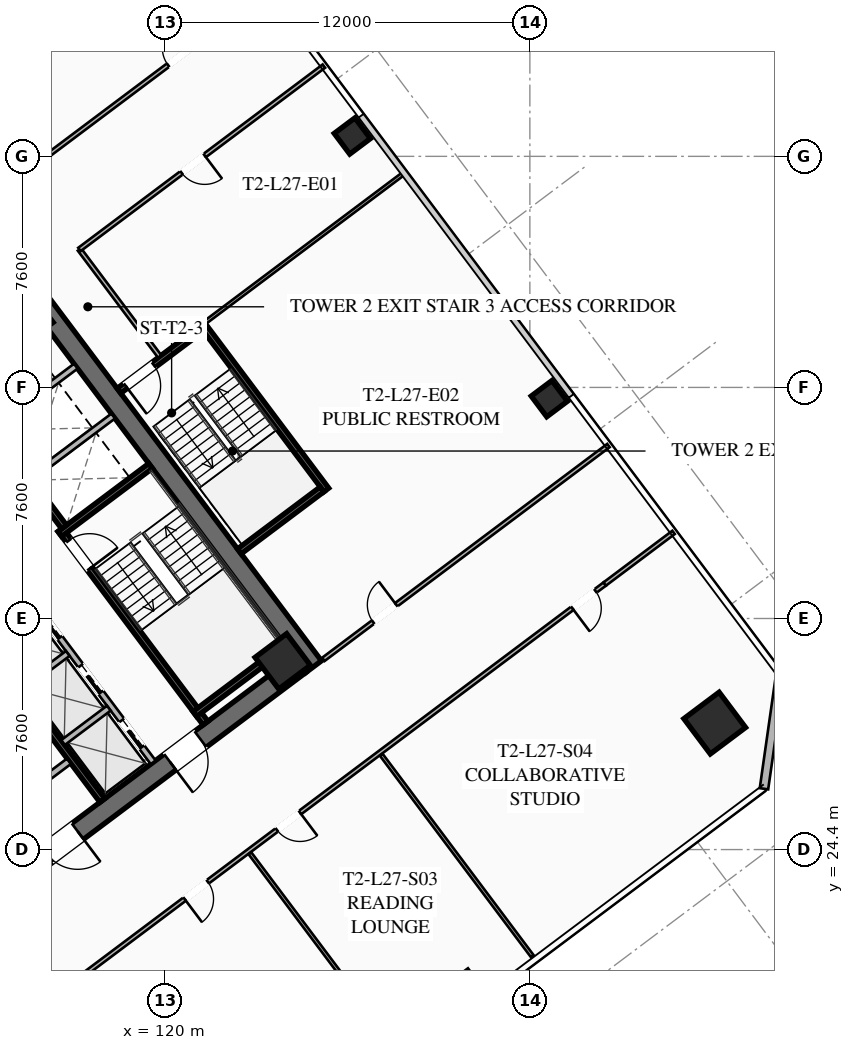
"""IFC4 building model, lengths in metres.
Left out: names, types, materials, properties, quantities, classifications, styles, units other than length and angle.
Written with IfcOpenShell. Run it as: python <this file> out.ifc"""

import sys

from ifc_helpers import new_model, si_unit, direction, frame, frame_2d, origin, origin_2d, place, context, subcontext, project, spatial, rectangle, hollow_rectangle, extrude, element, fill, save


model = new_model("IFC4")
c1 = context("Model", 3, precision=1e-05, world=origin(), true_north=direction((0.0, 1.0)))
c2 = subcontext(c1, "Body", "Model", "MODEL_VIEW")
j1 = project(units=[si_unit("LENGTHUNIT", "METRE"), si_unit("PLANEANGLEUNIT", "RADIAN")], contexts=[c1])
p1 = place(None, origin())
s1 = spatial("IfcSite", under=j1, at=p1, CompositionType="ELEMENT")
p2 = place(p1, origin())
s2 = spatial("IfcBuilding", under=s1, at=p2, CompositionType="ELEMENT")
p3 = place(p2, frame((0.0, 0.0, 102.7)))
s3 = spatial("IfcBuildingStorey", under=s2, at=p3, CompositionType="ELEMENT", Elevation=102.7)
p4 = place(p3, frame((115.524, 42.893, 0.0), z_axis=(0.0, 0.0, 1.0), x_axis=(0.600005007985, -0.799996243986, 0.0)))
e1 = element("IfcWall", 1, at=p4, inside=s3, PredefinedType="SHEAR", context=c2, shape_type="SweptSolid", body=[
    extrude(rectangle(XDim=15.6, YDim=0.65, at=frame_2d((7.8, 0.0))), origin(), (0.0, 0.0, 1.0), 3.55),
])
p5 = place(p3, frame((124.429, 30.478, 0.0), z_axis=(0.0, 0.0, 1.0), x_axis=(-0.799998028465, -0.600002628705, 0.0)))
e2 = element("IfcWall", 2, at=p5, inside=s3, PredefinedType="SHEAR", context=c2, shape_type="SweptSolid", body=[
    extrude(rectangle(XDim=14.86, YDim=0.65, at=frame_2d((7.43, 0.0))), origin(), (0.0, 0.0, 1.0), 3.55),
])
p6 = place(p5, frame((9.13, 0.0, 0.0)))
e3 = element("IfcOpeningElement", 3, at=p6, cuts=e2, PredefinedType="OPENING", context=c2, shape_type="SweptSolid", body=[
    extrude(rectangle(XDim=1.25, YDim=2.25, at=frame_2d((0.625, 1.125))), frame((0.0, 0.335, 0.0), z_axis=(0.0, -1.0, 0.0), x_axis=(1.0, 0.0, 0.0)), (0.0, 0.0, 1.0), 0.67),
])
p7 = place(p5, frame((4.08, 0.0, 0.0)))
e4 = element("IfcOpeningElement", 4, at=p7, cuts=e2, PredefinedType="OPENING", context=c2, shape_type="SweptSolid", body=[
    extrude(rectangle(XDim=1.25, YDim=2.25, at=frame_2d((0.625, 1.125))), frame((0.0, 0.335, 0.0), z_axis=(0.0, -1.0, 0.0), x_axis=(1.0, 0.0, 0.0)), (0.0, 0.0, 1.0), 0.67),
])
for number, where, z_axis, x_axis in (
    (5, (123.87, 30.59, 0.0), (0.0, 0.0, 1.0), (0.8, 0.6, 0.0)),
    (6, (115.41, 41.87, 0.0), (0.0, 0.0, 1.0), (0.8, 0.6, 0.0)),
):
    element("IfcColumn", number, at=place(p3, frame(where, z_axis=z_axis, x_axis=x_axis)), inside=s3, PredefinedType="COLUMN", context=c2, shape_type="SweptSolid", body=[
        extrude(hollow_rectangle(XDim=1.3, YDim=1.3, WallThickness=0.05, at=origin_2d()), origin(), (0.0, 0.0, 1.0), 3.35),
    ])
p8 = place(p3, frame((138.08, 28.56, 0.0), z_axis=(0.0, 0.0, 1.0), x_axis=(0.799999996291, 0.600000004945, 0.0)))
e7 = element("IfcColumn", 7, at=p8, inside=s3, PredefinedType="COLUMN", context=c2, shape_type="SweptSolid", body=[
    extrude(hollow_rectangle(XDim=1.45, YDim=1.45, WallThickness=0.055, at=origin_2d()), origin(), (0.0, 0.0, 1.0), 3.35),
])
for number, where, z_axis, x_axis in (
    (8, (132.64, 39.23, 0.0), (0.0, 0.0, 1.0), (0.8, 0.6, 0.0)),
    (9, (126.16, 47.87, 0.0), (0.0, 0.0, 1.0), (0.8, 0.6, 0.0)),
):
    element("IfcColumn", number, at=place(p3, frame(where, z_axis=z_axis, x_axis=x_axis)), inside=s3, PredefinedType="COLUMN", context=c2, shape_type="SweptSolid", body=[
        extrude(hollow_rectangle(XDim=0.85, YDim=0.85, WallThickness=0.035, at=origin_2d()), origin(), (0.0, 0.0, 1.0), 3.35),
    ])
p9 = place(p3, frame((140.24, 30.18, 0.0), z_axis=(0.0, 0.0, 1.0), x_axis=(-0.141430307517, -0.989948214866, 0.0)))
e10 = element("IfcWall", 10, at=p9, inside=s3, PredefinedType="SOLIDWALL", context=c2, shape_type="SweptSolid", body=[
    extrude(rectangle(XDim=3.818, YDim=0.28, at=frame_2d((1.909, 0.0))), origin(), (0.0, 0.0, 1.0), 3.35),
])
p10 = place(p3, frame((116.56, 34.92, 0.0), z_axis=(0.0, 0.0, 1.0), x_axis=(0.600009827119, -0.799992629566, 0.0)))
e11 = element("IfcWall", 11, at=p10, inside=s3, PredefinedType="SHEAR", context=c2, shape_type="SweptSolid", body=[
    extrude(rectangle(XDim=7.95, YDim=0.2, at=frame_2d((3.975, 0.0))), origin(), (0.0, 0.0, 1.0), 3.35),
])
p11 = place(p10, frame((0.45, 0.0, 0.0)))
e12 = element("IfcOpeningElement", 12, at=p11, cuts=e11, PredefinedType="OPENING", context=c2, shape_type="SweptSolid", body=[
    extrude(rectangle(XDim=1.15, YDim=2.2, at=frame_2d((0.575, 1.1))), frame((0.0, 0.11, 0.0), z_axis=(0.0, -1.0, 0.0), x_axis=(1.0, 0.0, 0.0)), (0.0, 0.0, 1.0), 0.22),
])
for number, where, z_axis, x_axis in (
    (13, (116.54, 34.78, 0.0), (0.0, 0.0, 1.0), (0.8, 0.6, 0.0)),
    (14, (120.98, 28.86, 0.0), (0.0, 0.0, 1.0), (0.8, 0.6, 0.0)),
):
    element("IfcWall", number, at=place(p3, frame(where, z_axis=z_axis, x_axis=x_axis)), inside=s3, PredefinedType="SHEAR", context=c2, shape_type="SweptSolid", body=[
        extrude(rectangle(XDim=3.73, YDim=0.2, at=frame_2d((1.865, 0.0))), origin(), (0.0, 0.0, 1.0), 3.35),
    ])
p12 = place(p3, frame((117.938, 26.016, 0.0), z_axis=(0.0, 0.0, 1.0), x_axis=(-0.600005463273, 0.799995902516, 0.0)))
e15 = element("IfcWall", 15, at=p12, inside=s3, PredefinedType="SHEAR", context=c2, shape_type="SweptSolid", body=[
    extrude(rectangle(XDim=14.3, YDim=0.2, at=frame_2d((7.15, 0.0))), origin(), (0.0, 0.0, 1.0), 3.35),
])
p13 = place(p3, frame((114.316, 25.412, 0.0), z_axis=(0.0, 0.0, 1.0), x_axis=(0.800018601094, 0.59997519774, 0.0)))
e16 = element("IfcWall", 16, at=p13, inside=s3, PredefinedType="SOLIDWALL", context=c2, shape_type="SweptSolid", body=[
    extrude(rectangle(XDim=3.15, YDim=0.22, at=frame_2d((1.575, 0.0))), origin(), (0.0, 0.0, 1.0), 2.703),
])
p14 = place(p13, frame((0.95, 0.0, 0.0)))
e17 = element("IfcOpeningElement", 17, at=p14, cuts=e16, PredefinedType="OPENING", context=c2, shape_type="SweptSolid", body=[
    extrude(rectangle(XDim=1.25, YDim=2.25, at=frame_2d((0.625, 1.125))), frame((0.0, 0.12, 0.0), z_axis=(0.0, -1.0, 0.0), x_axis=(1.0, 0.0, 0.0)), (0.0, 0.0, 1.0), 0.24),
])
p15 = place(p3, frame((112.87, 40.09, 0.0), z_axis=(0.0, 0.0, 1.0), x_axis=(0.599975393228, -0.800018454488, 0.0)))
e18 = element("IfcWall", 18, at=p15, inside=s3, PredefinedType="SHEAR", context=c2, shape_type="SweptSolid", body=[
    extrude(rectangle(XDim=6.35, YDim=0.2, at=frame_2d((3.175, 0.0))), origin(), (0.0, 0.0, 1.0), 3.35),
])
for number, where, z_axis, x_axis in (
    (19, (115.59, 36.63, 0.0), (0.0, 0.0, 1.0), (0.8, 0.6, 0.0)),
    (20, (114.36, 38.27, 0.0), (0.0, 0.0, 1.0), (0.8, 0.6, 0.0)),
):
    element("IfcWall", number, at=place(p3, frame(where, z_axis=z_axis, x_axis=x_axis)), inside=s3, PredefinedType="SOLIDWALL", context=c2, shape_type="SweptSolid", body=[
        extrude(rectangle(XDim=3.38, YDim=0.2, at=frame_2d((1.69, 0.0))), origin(), (0.0, 0.0, 1.0), 3.35),
    ])
p16 = place(p3, frame((119.61, 27.27, 0.0), z_axis=(0.0, 0.0, 1.0), x_axis=(-0.600011488909, 0.79999138319, 0.0)))
e21 = element("IfcWall", 21, at=p16, inside=s3, PredefinedType="SOLIDWALL", context=c2, shape_type="SweptSolid", body=[
    extrude(rectangle(XDim=6.8, YDim=0.2, at=frame_2d((3.4, 0.0))), origin(), (0.0, 0.0, 1.0), 3.35),
])
p17 = place(p16, frame((0.625, 0.0, 0.0)))
e22 = element("IfcOpeningElement", 22, at=p17, cuts=e21, PredefinedType="OPENING", context=c2, shape_type="SweptSolid", body=[
    extrude(rectangle(XDim=1.1, YDim=2.2, at=frame_2d((0.55, 1.1))), frame((0.0, 0.11, 0.0), z_axis=(0.0, -1.0, 0.0), x_axis=(1.0, 0.0, 0.0)), (0.0, 0.0, 1.0), 0.22),
])
p18 = place(p16, frame((2.875, 0.0, 0.0)))
e23 = element("IfcOpeningElement", 23, at=p18, cuts=e21, PredefinedType="OPENING", context=c2, shape_type="SweptSolid", body=[
    extrude(rectangle(XDim=1.1, YDim=2.2, at=frame_2d((0.55, 1.1))), frame((0.0, 0.11, 0.0), z_axis=(0.0, -1.0, 0.0), x_axis=(1.0, 0.0, 0.0)), (0.0, 0.0, 1.0), 0.22),
])
p19 = place(p16, frame((5.125, 0.0, 0.0)))
e24 = element("IfcOpeningElement", 24, at=p19, cuts=e21, PredefinedType="OPENING", context=c2, shape_type="SweptSolid", body=[
    extrude(rectangle(XDim=1.1, YDim=2.2, at=frame_2d((0.55, 1.1))), frame((0.0, 0.11, 0.0), z_axis=(0.0, -1.0, 0.0), x_axis=(1.0, 0.0, 0.0)), (0.0, 0.0, 1.0), 0.22),
])
p20 = place(p3, frame((116.646, 27.922, 0.0), z_axis=(0.0, 0.0, 1.0), x_axis=(0.8, 0.6, 0.0)))
e25 = element("IfcWall", 25, at=p20, inside=s3, PredefinedType="SOLIDWALL", context=c2, shape_type="SweptSolid", body=[
    extrude(rectangle(XDim=1.88, YDim=0.2, at=frame_2d((0.94, 0.0))), origin(), (0.0, 0.0, 1.0), 3.35),
])
p21 = place(p3, frame((115.296, 29.722, 0.0), z_axis=(0.0, 0.0, 1.0), x_axis=(0.799984418148, 0.600020775241, 0.0)))
e26 = element("IfcWall", 26, at=p21, inside=s3, PredefinedType="SOLIDWALL", context=c2, shape_type="SweptSolid", body=[
    extrude(rectangle(XDim=1.88, YDim=0.2, at=frame_2d((0.94, 0.0))), origin(), (0.0, 0.0, 1.0), 3.35),
])
p22 = place(p3, frame((125.304, 36.228, 0.0), z_axis=(0.0, 0.0, 1.0), x_axis=(-0.59998851072, 0.800008616831, 0.0)))
e27 = element("IfcWall", 27, at=p22, inside=s3, PredefinedType="SHEAR", context=c2, shape_type="SweptSolid", body=[
    extrude(rectangle(XDim=6.8, YDim=0.2, at=frame_2d((3.4, 0.0))), origin(), (0.0, 0.0, 1.0), 3.35),
])
p23 = place(p3, frame((121.204, 41.528, 0.0), z_axis=(0.0, 0.0, 1.0), x_axis=(-0.800017232136, -0.599977023131, 0.0)))
e28 = element("IfcWall", 28, at=p23, inside=s3, PredefinedType="SHEAR", context=c2, shape_type="SweptSolid", body=[
    extrude(rectangle(XDim=3.4, YDim=0.2, at=frame_2d((1.7, 0.0))), origin(), (0.0, 0.0, 1.0), 3.35),
])
p24 = place(p23, frame((1.975, 0.0, 0.0)))
e29 = element("IfcOpeningElement", 29, at=p24, cuts=e28, PredefinedType="OPENING", context=c2, shape_type="SweptSolid", body=[
    extrude(rectangle(XDim=1.15, YDim=2.2, at=frame_2d((0.575, 1.1))), frame((0.0, 0.11, 0.0), z_axis=(0.0, -1.0, 0.0), x_axis=(1.0, 0.0, 0.0)), (0.0, 0.0, 1.0), 0.22),
])
p25 = place(p3, frame((122.444, 34.208, 0.0), z_axis=(0.0, 0.0, 1.0), x_axis=(0.79999138319, 0.600011488909, 0.0)))
e30 = element("IfcWall", 30, at=p25, inside=s3, PredefinedType="SHEAR", context=c2, shape_type="SweptSolid", body=[
    extrude(rectangle(XDim=3.4, YDim=0.2, at=frame_2d((1.7, 0.0))), origin(), (0.0, 0.0, 1.0), 3.35),
])
p26 = place(p3, frame((119.824, 40.618, 0.0), z_axis=(0.0, 0.0, 1.0), x_axis=(-0.599982243973, 0.800013316712, 0.0)))
e31 = element("IfcWall", 31, at=p26, inside=s3, PredefinedType="PARTITIONING", context=c2, shape_type="SweptSolid", body=[
    extrude(rectangle(XDim=4.4, YDim=0.135, at=frame_2d((2.2, 0.0))), origin(), (0.0, 0.0, 1.0), 2.703),
])
p27 = place(p3, frame((98.316, 33.862, 0.0), z_axis=(0.0, 0.0, 1.0), x_axis=(0.8000041147, 0.599994513695, 0.0)))
e32 = element("IfcWall", 32, at=p27, inside=s3, PredefinedType="PARTITIONING", context=c2, shape_type="SweptSolid", body=[
    extrude(rectangle(XDim=28.48, YDim=0.135, at=frame_2d((14.24, 0.0))), origin(), (0.0, 0.0, 1.0), 2.703),
])
p28 = place(p27, frame((0.3, 0.0, 0.0)))
e33 = element("IfcOpeningElement", 33, at=p28, cuts=e32, PredefinedType="OPENING", context=c2, shape_type="SweptSolid", body=[
    extrude(rectangle(XDim=0.95, YDim=2.05, at=frame_2d((0.475, 1.025))), frame((0.0, 0.077, 0.0), z_axis=(0.0, -1.0, 0.0), x_axis=(1.0, 0.0, 0.0)), (0.0, 0.0, 1.0), 0.155),
])
p29 = place(p27, frame((10.9, 0.0, 0.0)))
e34 = element("IfcOpeningElement", 34, at=p29, cuts=e32, PredefinedType="OPENING", context=c2, shape_type="SweptSolid", body=[
    extrude(rectangle(XDim=0.95, YDim=2.05, at=frame_2d((0.475, 1.025))), frame((0.0, 0.077, 0.0), z_axis=(0.0, -1.0, 0.0), x_axis=(1.0, 0.0, 0.0)), (0.0, 0.0, 1.0), 0.155),
])
p30 = place(p27, frame((14.9, 0.0, 0.0)))
e35 = element("IfcOpeningElement", 35, at=p30, cuts=e32, PredefinedType="OPENING", context=c2, shape_type="SweptSolid", body=[
    extrude(rectangle(XDim=0.95, YDim=2.05, at=frame_2d((0.475, 1.025))), frame((0.0, 0.077, 0.0), z_axis=(0.0, -1.0, 0.0), x_axis=(1.0, 0.0, 0.0)), (0.0, 0.0, 1.0), 0.155),
])
p31 = place(p27, frame((27.23, 0.0, 0.0)))
e36 = element("IfcOpeningElement", 36, at=p31, cuts=e32, PredefinedType="OPENING", context=c2, shape_type="SweptSolid", body=[
    extrude(rectangle(XDim=0.95, YDim=2.05, at=frame_2d((0.475, 1.025))), frame((0.0, 0.077, 0.0), z_axis=(0.0, -1.0, 0.0), x_axis=(1.0, 0.0, 0.0)), (0.0, 0.0, 1.0), 0.155),
])
p32 = place(p3, frame((134.462, 33.134, 0.0), z_axis=(0.0, 0.0, 1.0), x_axis=(-0.799996913945, -0.600004114717, 0.0)))
e37 = element("IfcWall", 37, at=p32, inside=s3, PredefinedType="PARTITIONING", context=c2, shape_type="SweptSolid", body=[
    extrude(rectangle(XDim=28.48, YDim=0.135, at=frame_2d((14.24, 0.0))), origin(), (0.0, 0.0, 1.0), 2.703),
])
p33 = place(p32, frame((27.15, 0.0, 0.0)))
e38 = element("IfcOpeningElement", 38, at=p33, cuts=e37, PredefinedType="OPENING", context=c2, shape_type="SweptSolid", body=[
    extrude(rectangle(XDim=0.95, YDim=2.05, at=frame_2d((0.475, 1.025))), frame((0.0, 0.077, 0.0), z_axis=(0.0, -1.0, 0.0), x_axis=(1.0, 0.0, 0.0)), (0.0, 0.0, 1.0), 0.155),
])
p34 = place(p32, frame((16.321, 0.0, 0.0)))
e39 = element("IfcOpeningElement", 39, at=p34, cuts=e37, PredefinedType="OPENING", context=c2, shape_type="SweptSolid", body=[
    extrude(rectangle(XDim=0.95, YDim=2.05, at=frame_2d((0.475, 1.025))), frame((0.0, 0.077, 0.0), z_axis=(0.0, -1.0, 0.0), x_axis=(1.0, 0.0, 0.0)), (0.0, 0.0, 1.0), 0.155),
])
p35 = place(p32, frame((12.529, 0.0, 0.0)))
e40 = element("IfcOpeningElement", 40, at=p35, cuts=e37, PredefinedType="OPENING", context=c2, shape_type="SweptSolid", body=[
    extrude(rectangle(XDim=0.95, YDim=2.05, at=frame_2d((0.475, 1.025))), frame((0.0, 0.077, 0.0), z_axis=(0.0, -1.0, 0.0), x_axis=(1.0, 0.0, 0.0)), (0.0, 0.0, 1.0), 0.155),
])
p36 = place(p32, frame((0.38, 0.0, 0.0)))
e41 = element("IfcOpeningElement", 41, at=p36, cuts=e37, PredefinedType="OPENING", context=c2, shape_type="SweptSolid", body=[
    extrude(rectangle(XDim=0.95, YDim=2.05, at=frame_2d((0.475, 1.025))), frame((0.0, 0.077, 0.0), z_axis=(0.0, -1.0, 0.0), x_axis=(1.0, 0.0, 0.0)), (0.0, 0.0, 1.0), 0.155),
])
p37 = place(p3, frame((134.462, 33.134, 0.0), z_axis=(0.0, 0.0, 1.0), x_axis=(0.8000207031, 0.599972394874, 0.0)))
e42 = element("IfcWall", 42, at=p37, inside=s3, PredefinedType="PARTITIONING", context=c2, shape_type="SweptSolid", body=[
    extrude(rectangle(XDim=2.83, YDim=0.135, at=frame_2d((1.415, 0.0))), origin(), (0.0, 0.0, 1.0), 2.703),
])
p38 = place(p3, frame((127.758, 17.656, 0.0), z_axis=(0.0, 0.0, 1.0), x_axis=(-0.6, 0.8, 0.0)))
e43 = element("IfcWall", 43, at=p38, inside=s3, PredefinedType="PARTITIONING", context=c2, shape_type="SweptSolid", body=[
    extrude(rectangle(XDim=8.28, YDim=0.11, at=frame_2d((4.14, 0.0))), origin(), (0.0, 0.0, 1.0), 2.703),
])
p39 = place(p3, frame((132.078, 20.896, 0.0), z_axis=(0.0, 0.0, 1.0), x_axis=(-0.599981128793, 0.800014153057, 0.0)))
e44 = element("IfcWall", 44, at=p39, inside=s3, PredefinedType="PARTITIONING", context=c2, shape_type="SweptSolid", body=[
    extrude(rectangle(XDim=8.28, YDim=0.11, at=frame_2d((4.14, 0.0))), origin(), (0.0, 0.0, 1.0), 2.703),
])
p40 = place(p3, frame((125.224, 50.168, 0.0), z_axis=(0.0, 0.0, 1.0), x_axis=(-0.8, -0.6, 0.0)))
e45 = element("IfcWall", 45, at=p40, inside=s3, PredefinedType="PARTITIONING", context=c2, shape_type="SweptSolid", body=[
    extrude(rectangle(XDim=10.05, YDim=0.135, at=frame_2d((5.025, 0.0))), origin(), (0.0, 0.0, 1.0), 2.703),
])
p41 = place(p40, frame((4.9, 0.0, 0.0)))
e46 = element("IfcOpeningElement", 46, at=p41, cuts=e45, PredefinedType="OPENING", context=c2, shape_type="SweptSolid", body=[
    extrude(rectangle(XDim=0.95, YDim=2.05, at=frame_2d((0.475, 1.025))), frame((0.0, 0.077, 0.0), z_axis=(0.0, -1.0, 0.0), x_axis=(1.0, 0.0, 0.0)), (0.0, 0.0, 1.0), 0.155),
])
p42 = place(p3, frame((125.208, 30.656, 0.0), z_axis=(0.0, 0.0, 1.0), x_axis=(0.8, 0.6, 0.0)))
e47 = element("IfcWall", 47, at=p42, inside=s3, PredefinedType="PARTITIONING", context=c2, shape_type="SweptSolid", body=[
    extrude(rectangle(XDim=11.72, YDim=0.135, at=frame_2d((5.86, 0.0))), origin(), (0.0, 0.0, 1.0), 2.703),
])
p43 = place(p42, frame((2.045, 0.0, 0.0)))
e48 = element("IfcOpeningElement", 48, at=p43, cuts=e47, PredefinedType="OPENING", context=c2, shape_type="SweptSolid", body=[
    extrude(rectangle(XDim=0.95, YDim=2.05, at=frame_2d((0.475, 1.025))), frame((0.0, 0.077, 0.0), z_axis=(0.0, -1.0, 0.0), x_axis=(1.0, 0.0, 0.0)), (0.0, 0.0, 1.0), 0.155),
])
p44 = place(p3, frame((127.864, 46.648, 0.0), z_axis=(0.0, 0.0, 1.0), x_axis=(-0.800007145523, -0.599990472518, 0.0)))
e49 = element("IfcWall", 49, at=p44, inside=s3, PredefinedType="PARTITIONING", context=c2, shape_type="SweptSolid", body=[
    extrude(rectangle(XDim=8.2, YDim=0.11, at=frame_2d((4.1, 0.0))), origin(), (0.0, 0.0, 1.0), 2.703),
])
p45 = place(p6, origin())
e50 = element("IfcDoor", 50, at=p45, inside=s3, OperationType="SINGLE_SWING_LEFT", PredefinedType="DOOR", context=c2, shape_type="SweptSolid", body=[
    extrude(rectangle(XDim=1.25, YDim=2.25, at=frame_2d((0.625, 1.125))), frame((0.0, 0.025, 0.0), z_axis=(0.0, -1.0, 0.0), x_axis=(1.0, 0.0, 0.0)), (0.0, 0.0, 1.0), 0.05),
])
fill(e3, e50)
p46 = place(p7, origin())
e51 = element("IfcDoor", 51, at=p46, inside=s3, OperationType="SINGLE_SWING_RIGHT", PredefinedType="DOOR", context=c2, shape_type="SweptSolid", body=[
    extrude(rectangle(XDim=1.25, YDim=2.25, at=frame_2d((0.625, 1.125))), frame((0.0, 0.025, 0.0), z_axis=(0.0, -1.0, 0.0), x_axis=(1.0, 0.0, 0.0)), (0.0, 0.0, 1.0), 0.05),
])
fill(e4, e51)
p47 = place(p11, origin())
e52 = element("IfcDoor", 52, at=p47, inside=s3, OperationType="SINGLE_SWING_RIGHT", PredefinedType="DOOR", context=c2, shape_type="SweptSolid", body=[
    extrude(rectangle(XDim=1.15, YDim=2.2, at=frame_2d((0.575, 1.1))), frame((0.0, 0.025, 0.0), z_axis=(0.0, -1.0, 0.0), x_axis=(1.0, 0.0, 0.0)), (0.0, 0.0, 1.0), 0.05),
])
fill(e12, e52)
p48 = place(p24, origin())
e53 = element("IfcDoor", 53, at=p48, inside=s3, OperationType="SINGLE_SWING_RIGHT", PredefinedType="DOOR", context=c2, shape_type="SweptSolid", body=[
    extrude(rectangle(XDim=1.15, YDim=2.2, at=frame_2d((0.575, 1.1))), frame((0.0, 0.025, 0.0), z_axis=(0.0, -1.0, 0.0), x_axis=(1.0, 0.0, 0.0)), (0.0, 0.0, 1.0), 0.05),
])
fill(e29, e53)
p49 = place(p31, origin())
e54 = element("IfcDoor", 54, at=p49, inside=s3, OperationType="SINGLE_SWING_RIGHT", PredefinedType="DOOR", context=c2, shape_type="SweptSolid", body=[
    extrude(rectangle(XDim=0.95, YDim=2.05, at=frame_2d((0.475, 1.025))), frame((0.0, 0.025, 0.0), z_axis=(0.0, -1.0, 0.0), x_axis=(1.0, 0.0, 0.0)), (0.0, 0.0, 1.0), 0.05),
])
fill(e36, e54)
p50 = place(p34, origin())
e55 = element("IfcDoor", 55, at=p50, inside=s3, OperationType="SINGLE_SWING_RIGHT", PredefinedType="DOOR", context=c2, shape_type="SweptSolid", body=[
    extrude(rectangle(XDim=0.95, YDim=2.05, at=frame_2d((0.475, 1.025))), frame((0.0, 0.025, 0.0), z_axis=(0.0, -1.0, 0.0), x_axis=(1.0, 0.0, 0.0)), (0.0, 0.0, 1.0), 0.05),
])
fill(e39, e55)
p51 = place(p35, origin())
e56 = element("IfcDoor", 56, at=p51, inside=s3, OperationType="SINGLE_SWING_LEFT", PredefinedType="DOOR", context=c2, shape_type="SweptSolid", body=[
    extrude(rectangle(XDim=0.95, YDim=2.05, at=frame_2d((0.475, 1.025))), frame((0.0, 0.025, 0.0), z_axis=(0.0, -1.0, 0.0), x_axis=(1.0, 0.0, 0.0)), (0.0, 0.0, 1.0), 0.05),
])
fill(e40, e56)
p52 = place(p36, origin())
e57 = element("IfcDoor", 57, at=p52, inside=s3, OperationType="SINGLE_SWING_RIGHT", PredefinedType="DOOR", context=c2, shape_type="SweptSolid", body=[
    extrude(rectangle(XDim=0.95, YDim=2.05, at=frame_2d((0.475, 1.025))), frame((0.0, 0.025, 0.0), z_axis=(0.0, -1.0, 0.0), x_axis=(1.0, 0.0, 0.0)), (0.0, 0.0, 1.0), 0.05),
])
fill(e41, e57)
p53 = place(p41, origin())
e58 = element("IfcDoor", 58, at=p53, inside=s3, OperationType="SINGLE_SWING_LEFT", PredefinedType="DOOR", context=c2, shape_type="SweptSolid", body=[
    extrude(rectangle(XDim=0.95, YDim=2.05, at=frame_2d((0.475, 1.025))), frame((0.0, 0.025, 0.0), z_axis=(0.0, -1.0, 0.0), x_axis=(1.0, 0.0, 0.0)), (0.0, 0.0, 1.0), 0.05),
])
fill(e46, e58)
p54 = place(p43, origin())
e59 = element("IfcDoor", 59, at=p54, inside=s3, OperationType="SINGLE_SWING_RIGHT", PredefinedType="DOOR", context=c2, shape_type="SweptSolid", body=[
    extrude(rectangle(XDim=0.95, YDim=2.05, at=frame_2d((0.475, 1.025))), frame((0.0, 0.025, 0.0), z_axis=(0.0, -1.0, 0.0), x_axis=(1.0, 0.0, 0.0)), (0.0, 0.0, 1.0), 0.05),
])
fill(e48, e59)
p55 = place(p17, origin())
e60 = element("IfcDoor", 60, at=p55, inside=s3, OperationType="SLIDING_TO_LEFT", PredefinedType="DOOR", context=c2, shape_type="SweptSolid", body=[
    extrude(rectangle(XDim=1.1, YDim=2.2, at=frame_2d((0.55, 1.1))), frame((0.0, 0.025, 0.0), z_axis=(0.0, -1.0, 0.0), x_axis=(1.0, 0.0, 0.0)), (0.0, 0.0, 1.0), 0.05),
])
fill(e22, e60)
p56 = place(p18, origin())
e61 = element("IfcDoor", 61, at=p56, inside=s3, OperationType="SLIDING_TO_LEFT", PredefinedType="DOOR", context=c2, shape_type="SweptSolid", body=[
    extrude(rectangle(XDim=1.1, YDim=2.2, at=frame_2d((0.55, 1.1))), frame((0.0, 0.025, 0.0), z_axis=(0.0, -1.0, 0.0), x_axis=(1.0, 0.0, 0.0)), (0.0, 0.0, 1.0), 0.05),
])
fill(e23, e61)
p57 = place(p19, origin())
e62 = element("IfcDoor", 62, at=p57, inside=s3, OperationType="SLIDING_TO_LEFT", PredefinedType="DOOR", context=c2, shape_type="SweptSolid", body=[
    extrude(rectangle(XDim=1.1, YDim=2.2, at=frame_2d((0.55, 1.1))), frame((0.0, 0.025, 0.0), z_axis=(0.0, -1.0, 0.0), x_axis=(1.0, 0.0, 0.0)), (0.0, 0.0, 1.0), 0.05),
])
fill(e24, e62)
save(model, sys.argv[1])
